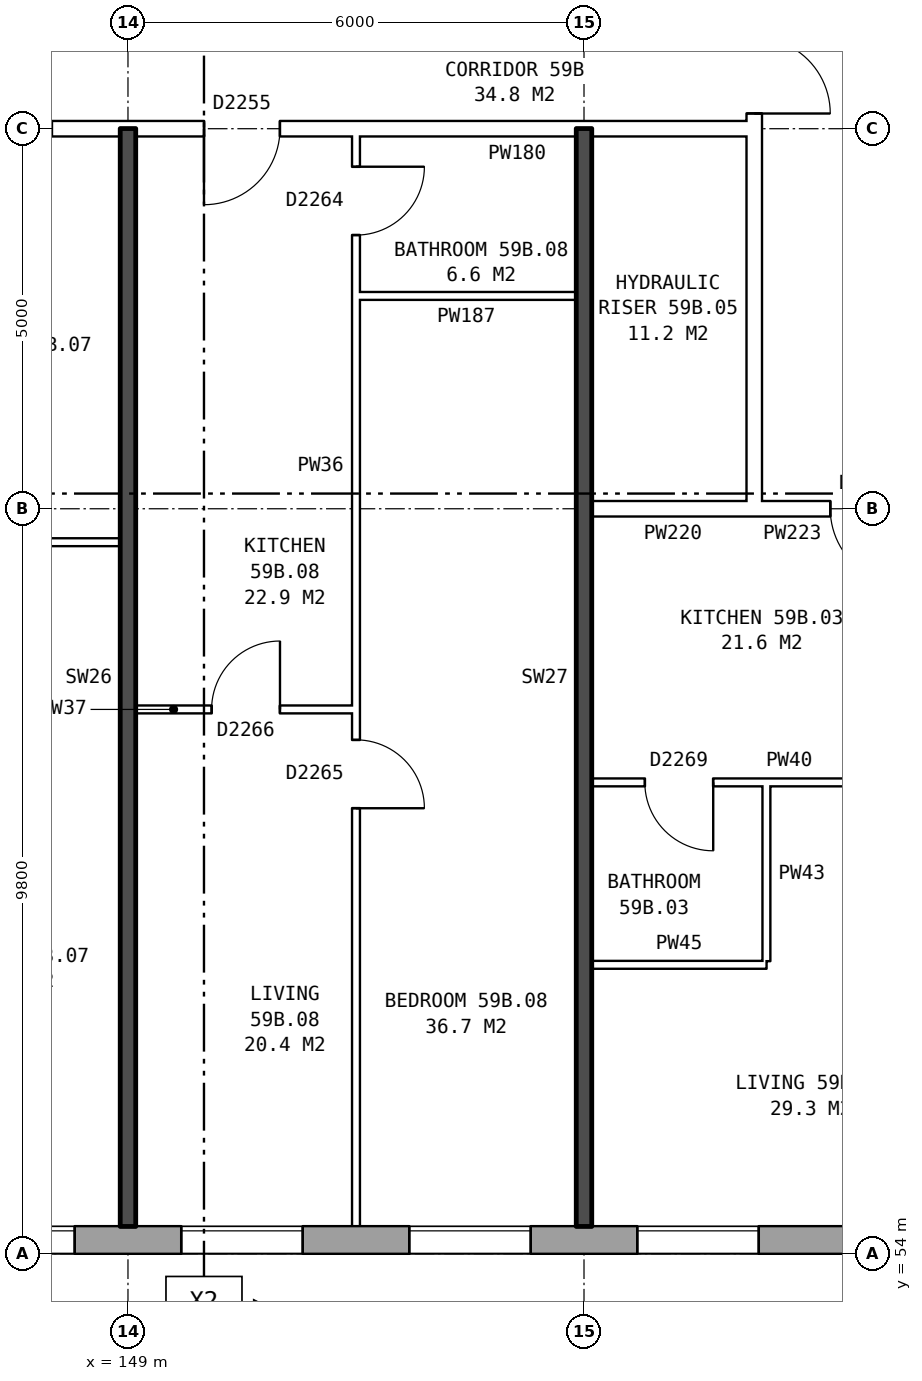
"""IFC4 building model, lengths in metres.
Left out: names, types, materials, properties, quantities, classifications, styles, units other than length and angle.
Written with IfcOpenShell. Run it as: python <this file> out.ifc"""

import sys

from ifc_helpers import new_model, si_unit, direction, frame, frame_2d, origin, place, context, subcontext, project, spatial, rectangle, extrude, element, fill, save


model = new_model("IFC4")
c1 = context("Model", 3, precision=1e-05, world=origin(), true_north=direction((0.0, 1.0)))
c2 = subcontext(c1, "Body", "Model", "MODEL_VIEW")
j1 = project(units=[si_unit("LENGTHUNIT", "METRE"), si_unit("PLANEANGLEUNIT", "RADIAN")], contexts=[c1])
p1 = place(None, origin())
s1 = spatial("IfcSite", under=j1, at=p1, CompositionType="ELEMENT")
p2 = place(p1, origin())
s2 = spatial("IfcBuilding", under=s1, at=p2, CompositionType="ELEMENT")
p3 = place(p2, frame((0.0, 0.0, 209.0)))
s3 = spatial("IfcBuildingStorey", under=s2, at=p3, CompositionType="ELEMENT", Elevation=209.0)
p4 = place(p3, frame((132.05, 54.18, 0.0), z_axis=(0.0, 0.0, 1.0), x_axis=(1.0, 0.0, 0.0)))
e1 = element("IfcWall", 1, at=p4, inside=s3, PredefinedType="STANDARD", context=c2, shape_type="SweptSolid", body=[
    extrude(rectangle(XDim=33.875, YDim=0.36, at=frame_2d((16.938, 0.0))), origin(), (0.0, 0.0, 1.0), 2.85),
])
p5 = place(p4, frame((0.3, 0.0, 0.8)))
e2 = element("IfcOpeningElement", 2, at=p5, cuts=e1, PredefinedType="OPENING", context=c2, shape_type="SweptSolid", body=[
    extrude(rectangle(XDim=1.4, YDim=1.8, at=frame_2d((0.7, 0.9))), frame((0.0, 0.19, 0.0), z_axis=(0.0, -1.0, 0.0), x_axis=(1.0, 0.0, 0.0)), (0.0, 0.0, 1.0), 0.38),
])
p6 = place(p4, frame((5.65, 0.0, 0.8)))
e3 = element("IfcOpeningElement", 3, at=p6, cuts=e1, PredefinedType="OPENING", context=c2, shape_type="SweptSolid", body=[
    extrude(rectangle(XDim=1.6, YDim=1.8, at=frame_2d((0.8, 0.9))), frame((0.0, 0.19, 0.0), z_axis=(0.0, -1.0, 0.0), x_axis=(1.0, 0.0, 0.0)), (0.0, 0.0, 1.0), 0.38),
])
p7 = place(p4, frame((8.65, 0.0, 0.8)))
e4 = element("IfcOpeningElement", 4, at=p7, cuts=e1, PredefinedType="OPENING", context=c2, shape_type="SweptSolid", body=[
    extrude(rectangle(XDim=1.6, YDim=1.8, at=frame_2d((0.8, 0.9))), frame((0.0, 0.19, 0.0), z_axis=(0.0, -1.0, 0.0), x_axis=(1.0, 0.0, 0.0)), (0.0, 0.0, 1.0), 0.38),
])
p8 = place(p4, frame((11.65, 0.0, 0.8)))
e5 = element("IfcOpeningElement", 5, at=p8, cuts=e1, PredefinedType="OPENING", context=c2, shape_type="SweptSolid", body=[
    extrude(rectangle(XDim=1.6, YDim=1.8, at=frame_2d((0.8, 0.9))), frame((0.0, 0.19, 0.0), z_axis=(0.0, -1.0, 0.0), x_axis=(1.0, 0.0, 0.0)), (0.0, 0.0, 1.0), 0.38),
])
p9 = place(p4, frame((14.65, 0.0, 0.8)))
e6 = element("IfcOpeningElement", 6, at=p9, cuts=e1, PredefinedType="OPENING", context=c2, shape_type="SweptSolid", body=[
    extrude(rectangle(XDim=1.6, YDim=1.8, at=frame_2d((0.8, 0.9))), frame((0.0, 0.19, 0.0), z_axis=(0.0, -1.0, 0.0), x_axis=(1.0, 0.0, 0.0)), (0.0, 0.0, 1.0), 0.38),
])
p10 = place(p4, frame((17.65, 0.0, 0.8)))
e7 = element("IfcOpeningElement", 7, at=p10, cuts=e1, PredefinedType="OPENING", context=c2, shape_type="SweptSolid", body=[
    extrude(rectangle(XDim=1.6, YDim=1.8, at=frame_2d((0.8, 0.9))), frame((0.0, 0.19, 0.0), z_axis=(0.0, -1.0, 0.0), x_axis=(1.0, 0.0, 0.0)), (0.0, 0.0, 1.0), 0.38),
])
p11 = place(p4, frame((20.65, 0.0, 0.8)))
e8 = element("IfcOpeningElement", 8, at=p11, cuts=e1, PredefinedType="OPENING", context=c2, shape_type="SweptSolid", body=[
    extrude(rectangle(XDim=1.6, YDim=1.8, at=frame_2d((0.8, 0.9))), frame((0.0, 0.19, 0.0), z_axis=(0.0, -1.0, 0.0), x_axis=(1.0, 0.0, 0.0)), (0.0, 0.0, 1.0), 0.38),
])
p12 = place(p4, frame((23.65, 0.0, 0.8)))
e9 = element("IfcOpeningElement", 9, at=p12, cuts=e1, PredefinedType="OPENING", context=c2, shape_type="SweptSolid", body=[
    extrude(rectangle(XDim=1.6, YDim=1.8, at=frame_2d((0.8, 0.9))), frame((0.0, 0.19, 0.0), z_axis=(0.0, -1.0, 0.0), x_axis=(1.0, 0.0, 0.0)), (0.0, 0.0, 1.0), 0.38),
])
p13 = place(p4, frame((26.65, 0.0, 0.8)))
e10 = element("IfcOpeningElement", 10, at=p13, cuts=e1, PredefinedType="OPENING", context=c2, shape_type="SweptSolid", body=[
    extrude(rectangle(XDim=1.6, YDim=1.8, at=frame_2d((0.8, 0.9))), frame((0.0, 0.19, 0.0), z_axis=(0.0, -1.0, 0.0), x_axis=(1.0, 0.0, 0.0)), (0.0, 0.0, 1.0), 0.38),
])
p14 = place(p4, frame((29.65, 0.0, 0.8)))
e11 = element("IfcOpeningElement", 11, at=p14, cuts=e1, PredefinedType="OPENING", context=c2, shape_type="SweptSolid", body=[
    extrude(rectangle(XDim=1.6, YDim=1.8, at=frame_2d((0.8, 0.9))), frame((0.0, 0.19, 0.0), z_axis=(0.0, -1.0, 0.0), x_axis=(1.0, 0.0, 0.0)), (0.0, 0.0, 1.0), 0.38),
])
p15 = place(p4, frame((2.0, 0.0, 0.9)))
e12 = element("IfcOpeningElement", 12, at=p15, cuts=e1, PredefinedType="OPENING", context=c2, shape_type="SweptSolid", body=[
    extrude(rectangle(XDim=0.8, YDim=1.5, at=frame_2d((0.4, 0.75))), frame((0.0, 0.19, 0.0), z_axis=(0.0, -1.0, 0.0), x_axis=(1.0, 0.0, 0.0)), (0.0, 0.0, 1.0), 0.38),
])
p16 = place(p3, frame((157.24, 63.9, 0.0), z_axis=(0.0, 0.0, 1.0), x_axis=(0.0, 1.0, 0.0)))
e13 = element("IfcWall", 13, at=p16, inside=s3, PredefinedType="PARTITIONING", context=c2, shape_type="SweptSolid", body=[
    extrude(rectangle(XDim=12.2, YDim=0.2, at=frame_2d((6.1, 0.0))), origin(), (0.0, 0.0, 1.0), 2.85),
])
p17 = place(p16, frame((5.1, 0.0, 0.0)))
e14 = element("IfcOpeningElement", 14, at=p17, cuts=e13, PredefinedType="OPENING", context=c2, shape_type="SweptSolid", body=[
    extrude(rectangle(XDim=2.0, YDim=2.1, at=frame_2d((1.0, 1.05))), frame((0.0, 0.11, 0.0), z_axis=(0.0, -1.0, 0.0), x_axis=(1.0, 0.0, 0.0)), (0.0, 0.0, 1.0), 0.22),
])
p18 = place(p3, frame((155.1, 57.8, 0.0), z_axis=(0.0, 0.0, 1.0), x_axis=(1.0, 0.0, 0.0)))
e15 = element("IfcWall", 15, at=p18, inside=s3, PredefinedType="PARTITIONING", context=c2, shape_type="SweptSolid", body=[
    extrude(rectangle(XDim=2.3, YDim=0.1, at=frame_2d((1.15, 0.0))), origin(), (0.0, 0.0, 1.0), 2.85),
])
p19 = place(p3, frame((155.1, 60.2, 0.0), z_axis=(0.0, 0.0, 1.0), x_axis=(1.0, 0.0, 0.0)))
e16 = element("IfcWall", 16, at=p19, inside=s3, PredefinedType="PARTITIONING", context=c2, shape_type="SweptSolid", body=[
    extrude(rectangle(XDim=5.8, YDim=0.1, at=frame_2d((2.9, 0.0))), origin(), (0.0, 0.0, 1.0), 2.85),
])
p20 = place(p19, frame((3.6, 0.0, 0.0)))
e17 = element("IfcOpeningElement", 17, at=p20, cuts=e16, PredefinedType="OPENING", context=c2, shape_type="SweptSolid", body=[
    extrude(rectangle(XDim=0.9, YDim=2.1, at=frame_2d((0.45, 1.05))), frame((0.0, 0.06, 0.0), z_axis=(0.0, -1.0, 0.0), x_axis=(1.0, 0.0, 0.0)), (0.0, 0.0, 1.0), 0.12),
])
p21 = place(p19, frame((0.7, 0.0, 0.0)))
e18 = element("IfcOpeningElement", 18, at=p21, cuts=e16, PredefinedType="OPENING", context=c2, shape_type="SweptSolid", body=[
    extrude(rectangle(XDim=0.9, YDim=2.1, at=frame_2d((0.45, 1.05))), frame((0.0, 0.06, 0.0), z_axis=(0.0, -1.0, 0.0), x_axis=(1.0, 0.0, 0.0)), (0.0, 0.0, 1.0), 0.12),
])
p22 = place(p3, frame((149.1, 61.16, 0.0), z_axis=(0.0, 0.0, 1.0), x_axis=(1.0, 0.0, 0.0)))
e19 = element("IfcWall", 19, at=p22, inside=s3, PredefinedType="PARTITIONING", context=c2, shape_type="SweptSolid", body=[
    extrude(rectangle(XDim=2.9, YDim=0.1, at=frame_2d((1.45, 0.0))), origin(), (0.0, 0.0, 1.0), 2.85),
])
p23 = place(p22, frame((1.0, 0.0, 0.0)))
e20 = element("IfcOpeningElement", 20, at=p23, cuts=e19, PredefinedType="OPENING", context=c2, shape_type="SweptSolid", body=[
    extrude(rectangle(XDim=0.9, YDim=2.1, at=frame_2d((0.45, 1.05))), frame((0.0, 0.06, 0.0), z_axis=(0.0, -1.0, 0.0), x_axis=(1.0, 0.0, 0.0)), (0.0, 0.0, 1.0), 0.12),
])
p24 = place(p3, frame((146.0, 63.36, 0.0), z_axis=(0.0, 0.0, 1.0), x_axis=(1.0, 0.0, 0.0)))
e21 = element("IfcWall", 21, at=p24, inside=s3, PredefinedType="PARTITIONING", context=c2, shape_type="SweptSolid", body=[
    extrude(rectangle(XDim=2.9, YDim=0.1, at=frame_2d((1.45, 0.0))), origin(), (0.0, 0.0, 1.0), 2.85),
])
p25 = place(p24, frame((1.0, 0.0, 0.0)))
e22 = element("IfcOpeningElement", 22, at=p25, cuts=e21, PredefinedType="OPENING", context=c2, shape_type="SweptSolid", body=[
    extrude(rectangle(XDim=0.9, YDim=2.1, at=frame_2d((0.45, 1.05))), frame((0.0, 0.06, 0.0), z_axis=(0.0, -1.0, 0.0), x_axis=(1.0, 0.0, 0.0)), (0.0, 0.0, 1.0), 0.12),
])
p26 = place(p3, frame((155.1, 63.8, 0.0), z_axis=(0.0, 0.0, 1.0), x_axis=(1.0, 0.0, 0.0)))
e23 = element("IfcWall", 23, at=p26, inside=s3, PredefinedType="PARTITIONING", context=c2, shape_type="SweptSolid", body=[
    extrude(rectangle(XDim=2.14, YDim=0.2, at=frame_2d((1.07, 0.0))), origin(), (0.0, 0.0, 1.0), 2.85),
])
p27 = place(p3, frame((157.24, 63.8, 0.0), z_axis=(0.0, 0.0, 1.0), x_axis=(1.0, 0.0, 0.0)))
e24 = element("IfcWall", 24, at=p27, inside=s3, PredefinedType="PARTITIONING", context=c2, shape_type="SweptSolid", body=[
    extrude(rectangle(XDim=3.0, YDim=0.2, at=frame_2d((1.5, 0.0))), origin(), (0.0, 0.0, 1.0), 2.85),
])
p28 = place(p27, frame((1.0, 0.0, 0.0)))
e25 = element("IfcOpeningElement", 25, at=p28, cuts=e24, PredefinedType="OPENING", context=c2, shape_type="SweptSolid", body=[
    extrude(rectangle(XDim=1.0, YDim=2.1, at=frame_2d((0.5, 1.05))), frame((0.0, 0.11, 0.0), z_axis=(0.0, -1.0, 0.0), x_axis=(1.0, 0.0, 0.0)), (0.0, 0.0, 1.0), 0.22),
])
p29 = place(p3, frame((152.0, 66.6, 0.0), z_axis=(0.0, 0.0, 1.0), x_axis=(1.0, 0.0, 0.0)))
e26 = element("IfcWall", 26, at=p29, inside=s3, PredefinedType="PARTITIONING", context=c2, shape_type="SweptSolid", body=[
    extrude(rectangle(XDim=2.9, YDim=0.1, at=frame_2d((1.45, 0.0))), origin(), (0.0, 0.0, 1.0), 2.85),
])
p30 = place(p3, frame((142.76, 68.8, 0.0), z_axis=(0.0, 0.0, 1.0), x_axis=(1.0, 0.0, 0.0)))
e27 = element("IfcWall", 27, at=p30, inside=s3, PredefinedType="PARTITIONING", context=c2, shape_type="SweptSolid", body=[
    extrude(rectangle(XDim=14.48, YDim=0.2, at=frame_2d((7.24, 0.0))), origin(), (0.0, 0.0, 1.0), 2.85),
])
p31 = place(p30, frame((4.24, 0.0, 0.0)))
e28 = element("IfcOpeningElement", 28, at=p31, cuts=e27, PredefinedType="OPENING", context=c2, shape_type="SweptSolid", body=[
    extrude(rectangle(XDim=1.0, YDim=2.1, at=frame_2d((0.5, 1.05))), frame((0.0, 0.11, 0.0), z_axis=(0.0, -1.0, 0.0), x_axis=(1.0, 0.0, 0.0)), (0.0, 0.0, 1.0), 0.22),
])
p32 = place(p30, frame((7.24, 0.0, 0.0)))
e29 = element("IfcOpeningElement", 29, at=p32, cuts=e27, PredefinedType="OPENING", context=c2, shape_type="SweptSolid", body=[
    extrude(rectangle(XDim=1.0, YDim=2.1, at=frame_2d((0.5, 1.05))), frame((0.0, 0.11, 0.0), z_axis=(0.0, -1.0, 0.0), x_axis=(1.0, 0.0, 0.0)), (0.0, 0.0, 1.0), 0.22),
])
p33 = place(p3, frame((149.0, 54.36, 0.0), z_axis=(0.0, 0.0, 1.0), x_axis=(0.0, 1.0, 0.0)))
e30 = element("IfcWall", 30, at=p33, inside=s3, PredefinedType="SOLIDWALL", context=c2, shape_type="SweptSolid", body=[
    extrude(rectangle(XDim=14.44, YDim=0.2, at=frame_2d((7.22, 0.0))), origin(), (0.0, 0.0, 1.0), 2.85),
])
p34 = place(p3, frame((152.0, 54.36, 0.0), z_axis=(0.0, 0.0, 1.0), x_axis=(0.0, 1.0, 0.0)))
e31 = element("IfcWall", 31, at=p34, inside=s3, PredefinedType="PARTITIONING", context=c2, shape_type="SweptSolid", body=[
    extrude(rectangle(XDim=14.34, YDim=0.1, at=frame_2d((7.17, 0.0))), origin(), (0.0, 0.0, 1.0), 2.85),
])
p35 = place(p34, frame((5.5, 0.0, 0.0)))
e32 = element("IfcOpeningElement", 32, at=p35, cuts=e31, PredefinedType="OPENING", context=c2, shape_type="SweptSolid", body=[
    extrude(rectangle(XDim=0.9, YDim=2.1, at=frame_2d((0.45, 1.05))), frame((0.0, 0.06, 0.0), z_axis=(0.0, -1.0, 0.0), x_axis=(1.0, 0.0, 0.0)), (0.0, 0.0, 1.0), 0.12),
])
p36 = place(p34, frame((13.04, 0.0, 0.0)))
e33 = element("IfcOpeningElement", 33, at=p36, cuts=e31, PredefinedType="OPENING", context=c2, shape_type="SweptSolid", body=[
    extrude(rectangle(XDim=0.9, YDim=2.1, at=frame_2d((0.45, 1.05))), frame((0.0, 0.06, 0.0), z_axis=(0.0, -1.0, 0.0), x_axis=(1.0, 0.0, 0.0)), (0.0, 0.0, 1.0), 0.12),
])
p37 = place(p3, frame((155.0, 54.36, 0.0), z_axis=(0.0, 0.0, 1.0), x_axis=(0.0, 1.0, 0.0)))
e34 = element("IfcWall", 34, at=p37, inside=s3, PredefinedType="SOLIDWALL", context=c2, shape_type="SweptSolid", body=[
    extrude(rectangle(XDim=14.44, YDim=0.2, at=frame_2d((7.22, 0.0))), origin(), (0.0, 0.0, 1.0), 2.85),
])
p38 = place(p3, frame((157.4, 57.85, 0.0), z_axis=(0.0, 0.0, 1.0), x_axis=(0.0, 1.0, 0.0)))
e35 = element("IfcWall", 35, at=p38, inside=s3, PredefinedType="PARTITIONING", context=c2, shape_type="SweptSolid", body=[
    extrude(rectangle(XDim=2.3, YDim=0.1, at=frame_2d((1.15, 0.0))), origin(), (0.0, 0.0, 1.0), 2.85),
])
p39 = place(p9, origin())
e36 = element("IfcWindow", 36, at=p39, inside=s3, PartitioningType="SINGLE_PANEL", PredefinedType="WINDOW", context=c2, shape_type="SweptSolid", body=[
    extrude(rectangle(XDim=1.6, YDim=1.8, at=frame_2d((0.8, 0.9))), frame((0.0, 0.15, 0.0), z_axis=(0.0, -1.0, 0.0), x_axis=(1.0, 0.0, 0.0)), (0.0, 0.0, 1.0), 0.06),
])
fill(e6, e36)
p40 = place(p10, origin())
e37 = element("IfcWindow", 37, at=p40, inside=s3, PartitioningType="SINGLE_PANEL", PredefinedType="WINDOW", context=c2, shape_type="SweptSolid", body=[
    extrude(rectangle(XDim=1.6, YDim=1.8, at=frame_2d((0.8, 0.9))), frame((0.0, 0.15, 0.0), z_axis=(0.0, -1.0, 0.0), x_axis=(1.0, 0.0, 0.0)), (0.0, 0.0, 1.0), 0.06),
])
fill(e7, e37)
p41 = place(p11, origin())
e38 = element("IfcWindow", 38, at=p41, inside=s3, PartitioningType="SINGLE_PANEL", PredefinedType="WINDOW", context=c2, shape_type="SweptSolid", body=[
    extrude(rectangle(XDim=1.6, YDim=1.8, at=frame_2d((0.8, 0.9))), frame((0.0, 0.15, 0.0), z_axis=(0.0, -1.0, 0.0), x_axis=(1.0, 0.0, 0.0)), (0.0, 0.0, 1.0), 0.06),
])
fill(e8, e38)
p42 = place(p12, origin())
e39 = element("IfcWindow", 39, at=p42, inside=s3, PartitioningType="SINGLE_PANEL", PredefinedType="WINDOW", context=c2, shape_type="SweptSolid", body=[
    extrude(rectangle(XDim=1.6, YDim=1.8, at=frame_2d((0.8, 0.9))), frame((0.0, 0.15, 0.0), z_axis=(0.0, -1.0, 0.0), x_axis=(1.0, 0.0, 0.0)), (0.0, 0.0, 1.0), 0.06),
])
fill(e9, e39)
p43 = place(p17, frame((2.0, 0.0, 0.0), z_axis=(0.0, 0.0, 1.0), x_axis=(-1.0, 0.0, 0.0)))
e40 = element("IfcDoor", 40, at=p43, inside=s3, OperationType="DOUBLE_DOOR_SINGLE_SWING", PredefinedType="DOOR", context=c2, shape_type="SweptSolid", body=[
    extrude(rectangle(XDim=2.0, YDim=2.1, at=frame_2d((1.0, 1.05))), frame((0.0, 0.025, 0.0), z_axis=(0.0, -1.0, 0.0), x_axis=(1.0, 0.0, 0.0)), (0.0, 0.0, 1.0), 0.05),
])
fill(e14, e40)
p44 = place(p28, frame((1.0, 0.0, 0.0), z_axis=(0.0, 0.0, 1.0), x_axis=(-1.0, 0.0, 0.0)))
e41 = element("IfcDoor", 41, at=p44, inside=s3, OperationType="SINGLE_SWING_LEFT", PredefinedType="DOOR", context=c2, shape_type="SweptSolid", body=[
    extrude(rectangle(XDim=1.0, YDim=2.1, at=frame_2d((0.5, 1.05))), frame((0.0, 0.025, 0.0), z_axis=(0.0, -1.0, 0.0), x_axis=(1.0, 0.0, 0.0)), (0.0, 0.0, 1.0), 0.05),
])
fill(e25, e41)
p45 = place(p21, frame((0.9, 0.0, 0.0), z_axis=(0.0, 0.0, 1.0), x_axis=(-1.0, 0.0, 0.0)))
e42 = element("IfcDoor", 42, at=p45, inside=s3, OperationType="SINGLE_SWING_LEFT", PredefinedType="DOOR", context=c2, shape_type="SweptSolid", body=[
    extrude(rectangle(XDim=0.9, YDim=2.1, at=frame_2d((0.45, 1.05))), frame((0.0, 0.025, 0.0), z_axis=(0.0, -1.0, 0.0), x_axis=(1.0, 0.0, 0.0)), (0.0, 0.0, 1.0), 0.05),
])
fill(e18, e42)
p46 = place(p35, frame((0.9, 0.0, 0.0), z_axis=(0.0, 0.0, 1.0), x_axis=(-1.0, 0.0, 0.0)))
e43 = element("IfcDoor", 43, at=p46, inside=s3, OperationType="SINGLE_SWING_RIGHT", PredefinedType="DOOR", context=c2, shape_type="SweptSolid", body=[
    extrude(rectangle(XDim=0.9, YDim=2.1, at=frame_2d((0.45, 1.05))), frame((0.0, 0.025, 0.0), z_axis=(0.0, -1.0, 0.0), x_axis=(1.0, 0.0, 0.0)), (0.0, 0.0, 1.0), 0.05),
])
fill(e32, e43)
p47 = place(p32, frame((1.0, 0.0, 0.0), z_axis=(0.0, 0.0, 1.0), x_axis=(-1.0, 0.0, 0.0)))
e44 = element("IfcDoor", 44, at=p47, inside=s3, OperationType="SINGLE_SWING_RIGHT", PredefinedType="DOOR", context=c2, shape_type="SweptSolid", body=[
    extrude(rectangle(XDim=1.0, YDim=2.1, at=frame_2d((0.5, 1.05))), frame((0.0, 0.025, 0.0), z_axis=(0.0, -1.0, 0.0), x_axis=(1.0, 0.0, 0.0)), (0.0, 0.0, 1.0), 0.05),
])
fill(e29, e44)
p48 = place(p23, origin())
e45 = element("IfcDoor", 45, at=p48, inside=s3, OperationType="SINGLE_SWING_RIGHT", PredefinedType="DOOR", context=c2, shape_type="SweptSolid", body=[
    extrude(rectangle(XDim=0.9, YDim=2.1, at=frame_2d((0.45, 1.05))), frame((0.0, 0.025, 0.0), z_axis=(0.0, -1.0, 0.0), x_axis=(1.0, 0.0, 0.0)), (0.0, 0.0, 1.0), 0.05),
])
fill(e20, e45)
p49 = place(p36, frame((0.9, 0.0, 0.0), z_axis=(0.0, 0.0, 1.0), x_axis=(-1.0, 0.0, 0.0)))
e46 = element("IfcDoor", 46, at=p49, inside=s3, OperationType="SINGLE_SWING_LEFT", PredefinedType="DOOR", context=c2, shape_type="SweptSolid", body=[
    extrude(rectangle(XDim=0.9, YDim=2.1, at=frame_2d((0.45, 1.05))), frame((0.0, 0.025, 0.0), z_axis=(0.0, -1.0, 0.0), x_axis=(1.0, 0.0, 0.0)), (0.0, 0.0, 1.0), 0.05),
])
fill(e33, e46)
save(model, sys.argv[1])
